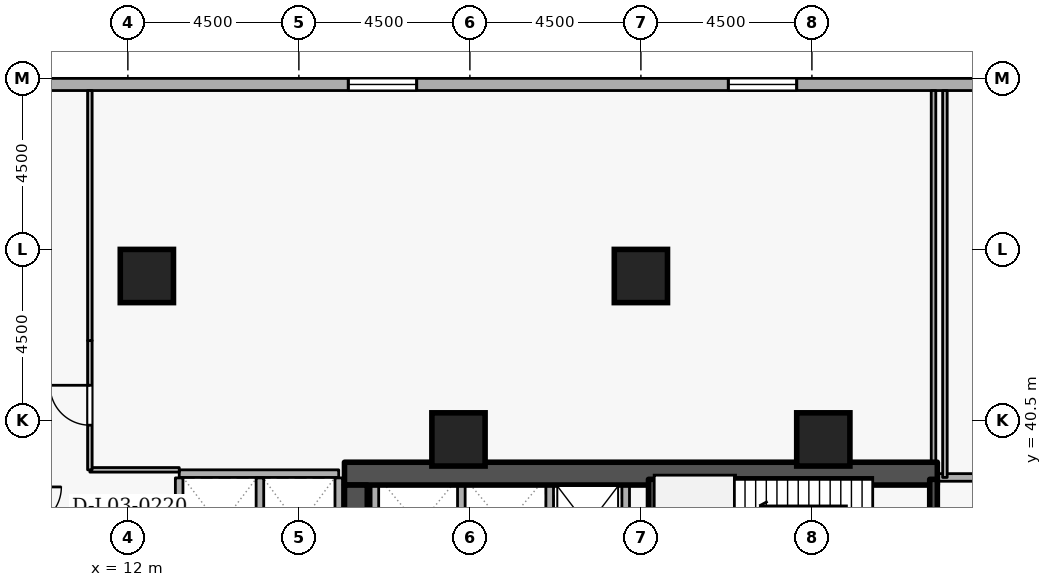
"""IFC4 building model, lengths in metres.
Left out: names, types, materials, properties, quantities, classifications, styles, units other than length and angle.
Written with IfcOpenShell. Run it as: python <this file> out.ifc"""

import sys

from ifc_helpers import new_model, si_unit, direction, frame, frame_2d, origin, origin_2d, place, context, subcontext, project, spatial, rectangle, extrude, element, fill, save


model = new_model("IFC4")
c1 = context("Model", 3, precision=1e-05, world=origin(), true_north=direction((0.0, 1.0)))
c2 = subcontext(c1, "Body", "Model", "MODEL_VIEW")
j1 = project(units=[si_unit("LENGTHUNIT", "METRE"), si_unit("PLANEANGLEUNIT", "RADIAN")], contexts=[c1])
p1 = place(None, origin())
s1 = spatial("IfcSite", under=j1, at=p1, CompositionType="ELEMENT")
p2 = place(p1, origin())
s2 = spatial("IfcBuilding", under=s1, at=p2, CompositionType="ELEMENT")
p3 = place(p2, frame((0.0, 0.0, 14.1)))
s3 = spatial("IfcBuildingStorey", under=s2, at=p3, CompositionType="ELEMENT", Elevation=14.1)
p4 = place(p3, frame((17.7, 39.1, 0.0), z_axis=(0.0, 0.0, 1.0), x_axis=(1.0, 0.0, 0.0)))
e1 = element("IfcWall", 1, at=p4, inside=s3, PredefinedType="SHEAR", context=c2, shape_type="SweptSolid", body=[
    extrude(rectangle(XDim=15.6, YDim=0.6, at=frame_2d((7.8, 0.0))), origin(), (0.0, 0.0, 1.0), 4.5),
])
p5 = place(p3, frame((18.0, 33.1, 0.0), z_axis=(0.0, 0.0, 1.0), x_axis=(0.0, 1.0, 0.0)))
e2 = element("IfcWall", 2, at=p5, inside=s3, PredefinedType="SHEAR", context=c2, shape_type="SweptSolid", body=[
    extrude(rectangle(XDim=5.7, YDim=0.6, at=frame_2d((2.85, 0.0))), origin(), (0.0, 0.0, 1.0), 4.5),
])
for number, where, z_axis, x_axis in (
    (3, (12.5, 44.3, 0.0), (0.0, 0.0, 1.0), (1.0, 0.0, 0.0)),
    (4, (25.5, 44.3, 0.0), (0.0, 0.0, 1.0), (1.0, 0.0, 0.0)),
    (5, (20.7, 40.0, 0.0), (0.0, 0.0, 1.0), (1.0, 0.0, 0.0)),
    (6, (30.3, 40.0, 0.0), (0.0, 0.0, 1.0), (1.0, 0.0, 0.0)),
):
    element("IfcColumn", number, at=place(p3, frame(where, z_axis=z_axis, x_axis=x_axis)), inside=s3, PredefinedType="COLUMN", context=c2, shape_type="SweptSolid", body=[
        extrude(rectangle(XDim=1.4, YDim=1.4, at=origin_2d()), origin(), (0.0, 0.0, 1.0), 4.5),
    ])
p6 = place(p3, frame((42.4, 49.34, 0.0), z_axis=(0.0, 0.0, 1.0), x_axis=(-1.0, 0.0, 0.0)))
e7 = element("IfcWall", 7, at=p6, inside=s3, PredefinedType="STANDARD", context=c2, shape_type="SweptSolid", body=[
    extrude(rectangle(XDim=39.4, YDim=0.32, at=frame_2d((19.7, 0.0))), origin(), (0.0, 0.0, 1.0), 3.56),
])
p7 = place(p6, frame((12.8, 0.0, 0.78)))
e8 = element("IfcOpeningElement", 8, at=p7, cuts=e7, PredefinedType="OPENING", context=c2, shape_type="SweptSolid", body=[
    extrude(rectangle(XDim=1.8, YDim=2.15, at=frame_2d((0.9, 1.075))), frame((0.0, 0.17, 0.0), z_axis=(0.0, -1.0, 0.0), x_axis=(1.0, 0.0, 0.0)), (0.0, 0.0, 1.0), 0.34),
])
p8 = place(p6, frame((22.8, 0.0, 0.78)))
e9 = element("IfcOpeningElement", 9, at=p8, cuts=e7, PredefinedType="OPENING", context=c2, shape_type="SweptSolid", body=[
    extrude(rectangle(XDim=1.8, YDim=2.15, at=frame_2d((0.9, 1.075))), frame((0.0, 0.17, 0.0), z_axis=(0.0, -1.0, 0.0), x_axis=(1.0, 0.0, 0.0)), (0.0, 0.0, 1.0), 0.34),
])
for number, where, z_axis, x_axis in (
    (10, (25.1, 36.352, 0.0), (0.0, 0.0, 1.0), (0.0, 1.0, 0.0)),
    (11, (23.1, 36.352, 0.0), (0.0, 0.0, 1.0), (0.0, 1.0, 0.0)),
    (12, (20.775, 36.352, 0.0), (0.0, 0.0, 1.0), (0.0, 1.0, 0.0)),
    (13, (18.5, 36.352, 0.0), (0.0, 0.0, 1.0), (0.0, 1.0, 0.0)),
):
    element("IfcWall", number, at=place(p3, frame(where, z_axis=z_axis, x_axis=x_axis)), inside=s3, PredefinedType="STANDARD", context=c2, shape_type="SweptSolid", body=[
        extrude(rectangle(XDim=2.436, YDim=0.2, at=frame_2d((1.218, 0.0))), origin(), (0.0, 0.0, 1.0), 4.16),
    ])
p9 = place(p3, frame((13.352, 39.1, 0.0), z_axis=(0.0, 0.0, 1.0), x_axis=(1.0, 0.0, 0.0)))
e14 = element("IfcWall", 14, at=p9, inside=s3, PredefinedType="STANDARD", context=c2, shape_type="SweptSolid", body=[
    extrude(rectangle(XDim=4.196, YDim=0.2, at=frame_2d((2.098, 0.0))), origin(), (0.0, 0.0, 1.0), 4.16),
])
p10 = place(p3, frame((17.55, 36.352, 0.0), z_axis=(0.0, 0.0, 1.0), x_axis=(0.0, 1.0, 0.0)))
e15 = element("IfcWall", 15, at=p10, inside=s3, PredefinedType="STANDARD", context=c2, shape_type="SweptSolid", body=[
    extrude(rectangle(XDim=2.636, YDim=0.2, at=frame_2d((1.318, 0.0))), origin(), (0.0, 0.0, 1.0), 3.365),
])
for number, where, z_axis, x_axis in (
    (16, (15.475, 36.352, 0.0), (0.0, 0.0, 1.0), (0.0, 1.0, 0.0)),
    (17, (13.35, 36.352, 0.0), (0.0, 0.0, 1.0), (0.0, 1.0, 0.0)),
):
    element("IfcWall", number, at=place(p3, frame(where, z_axis=z_axis, x_axis=x_axis)), inside=s3, PredefinedType="STANDARD", context=c2, shape_type="SweptSolid", body=[
        extrude(rectangle(XDim=2.636, YDim=0.2, at=frame_2d((1.318, 0.0))), origin(), (0.0, 0.0, 1.0), 4.16),
    ])
p11 = place(p3, frame((33.2, 38.95, 0.0), z_axis=(0.0, 0.0, 1.0), x_axis=(0.0, -1.0, 0.0)))
e18 = element("IfcWall", 18, at=p11, inside=s3, PredefinedType="SHEAR", context=c2, shape_type="SweptSolid", body=[
    extrude(rectangle(XDim=3.35, YDim=0.2, at=frame_2d((1.675, 0.0))), origin(), (0.0, 0.0, 1.0), 4.5),
])
p12 = place(p11, frame((1.125, 0.0, 0.0)))
e19 = element("IfcOpeningElement", 19, at=p12, cuts=e18, PredefinedType="OPENING", context=c2, shape_type="SweptSolid", body=[
    extrude(rectangle(XDim=1.1, YDim=2.1, at=frame_2d((0.55, 1.05))), frame((0.0, 0.11, 0.0), z_axis=(0.0, -1.0, 0.0), x_axis=(1.0, 0.0, 0.0)), (0.0, 0.0, 1.0), 0.22),
])
p13 = place(p3, frame((25.8, 35.6, 0.0), z_axis=(0.0, 0.0, 1.0), x_axis=(0.0, 1.0, 0.0)))
e20 = element("IfcWall", 20, at=p13, inside=s3, PredefinedType="SHEAR", context=c2, shape_type="SweptSolid", body=[
    extrude(rectangle(XDim=3.35, YDim=0.2, at=frame_2d((1.675, 0.0))), origin(), (0.0, 0.0, 1.0), 4.5),
])
p14 = place(p3, frame((35.8, 39.0, 0.0), z_axis=(0.0, 0.0, 1.0), x_axis=(-1.0, 0.0, 0.0)))
e21 = element("IfcWall", 21, at=p14, inside=s3, PredefinedType="STANDARD", context=c2, shape_type="SweptSolid", body=[
    extrude(rectangle(XDim=2.5, YDim=0.2, at=frame_2d((1.25, 0.0))), origin(), (0.0, 0.0, 1.0), 4.16),
])
p15 = place(p3, frame((33.5, 39.0, 0.0), z_axis=(0.0, 0.0, 1.0), x_axis=(0.0, 1.0, 0.0)))
e22 = element("IfcWall", 22, at=p15, inside=s3, PredefinedType="PARTITIONING", context=c2, shape_type="SweptSolid", body=[
    extrude(rectangle(XDim=10.18, YDim=0.12, at=frame_2d((5.09, 0.0))), origin(), (0.0, 0.0, 1.0), 4.16),
])
p16 = place(p3, frame((33.2, 49.18, 0.0), z_axis=(0.0, 0.0, 1.0), x_axis=(0.0, -1.0, 0.0)))
e23 = element("IfcWall", 23, at=p16, inside=s3, PredefinedType="PARTITIONING", context=c2, shape_type="SweptSolid", body=[
    extrude(rectangle(XDim=9.98, YDim=0.12, at=frame_2d((4.99, 0.0))), origin(), (0.0, 0.0, 1.0), 4.16),
])
p17 = place(p3, frame((13.352, 39.2, 0.0), z_axis=(0.0, 0.0, 1.0), x_axis=(-1.0, 0.0, 0.0)))
e24 = element("IfcWall", 24, at=p17, inside=s3, PredefinedType="PARTITIONING", context=c2, shape_type="SweptSolid", body=[
    extrude(rectangle(XDim=2.352, YDim=0.12, at=frame_2d((1.176, 0.0))), origin(), (0.0, 0.0, 1.0), 4.16),
])
p18 = place(p3, frame((11.0, 39.2, 0.0), z_axis=(0.0, 0.0, 1.0), x_axis=(0.0, 1.0, 0.0)))
e25 = element("IfcWall", 25, at=p18, inside=s3, PredefinedType="PARTITIONING", context=c2, shape_type="SweptSolid", body=[
    extrude(rectangle(XDim=3.4, YDim=0.12, at=frame_2d((1.7, 0.0))), origin(), (0.0, 0.0, 1.0), 4.16),
])
p19 = place(p18, frame((1.175, 0.0, 0.0)))
e26 = element("IfcOpeningElement", 26, at=p19, cuts=e25, PredefinedType="OPENING", context=c2, shape_type="SweptSolid", body=[
    extrude(rectangle(XDim=1.05, YDim=2.1, at=frame_2d((0.525, 1.05))), frame((0.0, 0.07, 0.0), z_axis=(0.0, -1.0, 0.0), x_axis=(1.0, 0.0, 0.0)), (0.0, 0.0, 1.0), 0.14),
])
p20 = place(p3, frame((11.0, 42.6, 0.0), z_axis=(0.0, 0.0, 1.0), x_axis=(0.0, 1.0, 0.0)))
e27 = element("IfcWall", 27, at=p20, inside=s3, PredefinedType="PARTITIONING", context=c2, shape_type="SweptSolid", body=[
    extrude(rectangle(XDim=6.58, YDim=0.12, at=frame_2d((3.29, 0.0))), origin(), (0.0, 0.0, 1.0), 4.16),
])
p21 = place(p7, origin())
e28 = element("IfcWindow", 28, at=p21, inside=s3, PartitioningType="SINGLE_PANEL", PredefinedType="WINDOW", context=c2, shape_type="SweptSolid", body=[
    extrude(rectangle(XDim=1.8, YDim=2.15, at=frame_2d((0.9, 1.075))), frame((0.0, 0.03, 0.0), z_axis=(0.0, -1.0, 0.0), x_axis=(1.0, 0.0, 0.0)), (0.0, 0.0, 1.0), 0.06),
])
fill(e8, e28)
p22 = place(p8, origin())
e29 = element("IfcWindow", 29, at=p22, inside=s3, PartitioningType="SINGLE_PANEL", PredefinedType="WINDOW", context=c2, shape_type="SweptSolid", body=[
    extrude(rectangle(XDim=1.8, YDim=2.15, at=frame_2d((0.9, 1.075))), frame((0.0, 0.03, 0.0), z_axis=(0.0, -1.0, 0.0), x_axis=(1.0, 0.0, 0.0)), (0.0, 0.0, 1.0), 0.06),
])
fill(e9, e29)
p23 = place(p19, origin())
e30 = element("IfcDoor", 30, at=p23, inside=s3, OperationType="SINGLE_SWING_RIGHT", PredefinedType="DOOR", context=c2, shape_type="SweptSolid", body=[
    extrude(rectangle(XDim=1.05, YDim=2.1, at=frame_2d((0.525, 1.05))), frame((0.0, 0.025, 0.0), z_axis=(0.0, -1.0, 0.0), x_axis=(1.0, 0.0, 0.0)), (0.0, 0.0, 1.0), 0.05),
])
fill(e26, e30)
save(model, sys.argv[1])
